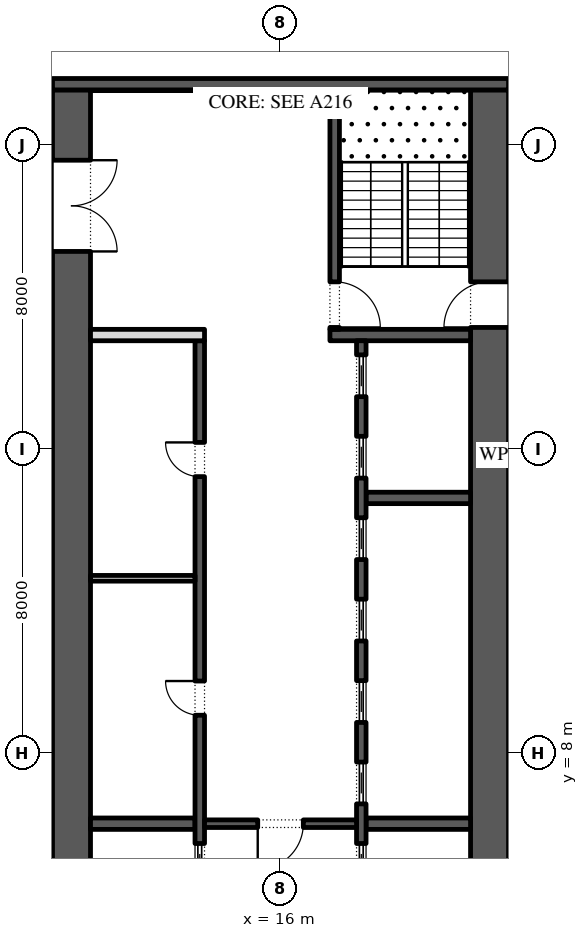
"""IFC4 building model, lengths in metres.
Left out: names, types, materials, properties, quantities, classifications, styles, units other than length and angle.
Written with IfcOpenShell. Run it as: python <this file> out.ifc"""

import sys

from ifc_helpers import new_model, si_unit, direction, frame, frame_2d, origin, place, context, subcontext, project, spatial, rectangle, extrude, element, fill, save


model = new_model("IFC4")
c1 = context("Model", 3, precision=1e-05, world=origin(), true_north=direction((0.0, 1.0)))
c2 = subcontext(c1, "Body", "Model", "MODEL_VIEW")
j1 = project(units=[si_unit("LENGTHUNIT", "METRE"), si_unit("PLANEANGLEUNIT", "RADIAN")], contexts=[c1])
p1 = place(None, origin())
s1 = spatial("IfcSite", under=j1, at=p1, CompositionType="ELEMENT")
p2 = place(p1, origin())
s2 = spatial("IfcBuilding", under=s1, at=p2, CompositionType="ELEMENT")
p3 = place(p2, frame((0.0, 0.0, 64.8)))
s3 = spatial("IfcBuildingStorey", under=s2, at=p3, CompositionType="ELEMENT", Elevation=64.8)
p4 = place(p3, frame((21.5, -2.45, 0.0), z_axis=(0.0, 0.0, 1.0), x_axis=(0.0, 1.0, 0.0)))
e1 = element("IfcWall", 1, at=p4, inside=s3, PredefinedType="SHEAR", context=c2, shape_type="SweptSolid", body=[
    extrude(rectangle(XDim=27.9, YDim=1.0, at=frame_2d((13.95, 0.0))), origin(), (0.0, 0.0, 1.0), 4.0),
])
p5 = place(p4, frame((5.05, 0.0, 0.0)))
e2 = element("IfcOpeningElement", 2, at=p5, cuts=e1, PredefinedType="OPENING", context=c2, shape_type="SweptSolid", body=[
    extrude(rectangle(XDim=1.2, YDim=2.1, at=frame_2d((0.6, 1.05))), frame((0.0, 0.51, 0.0), z_axis=(0.0, -1.0, 0.0), x_axis=(1.0, 0.0, 0.0)), (0.0, 0.0, 1.0), 1.02),
])
p6 = place(p4, frame((21.65, 0.0, 0.0)))
e3 = element("IfcOpeningElement", 3, at=p6, cuts=e1, PredefinedType="OPENING", context=c2, shape_type="SweptSolid", body=[
    extrude(rectangle(XDim=1.2, YDim=2.1, at=frame_2d((0.6, 1.05))), frame((0.0, 0.51, 0.0), z_axis=(0.0, -1.0, 0.0), x_axis=(1.0, 0.0, 0.0)), (0.0, 0.0, 1.0), 1.02),
])
p7 = place(p3, frame((10.5, -2.45, 0.0), z_axis=(0.0, 0.0, 1.0), x_axis=(0.0, 1.0, 0.0)))
e4 = element("IfcWall", 4, at=p7, inside=s3, PredefinedType="SHEAR", context=c2, shape_type="SweptSolid", body=[
    extrude(rectangle(XDim=27.9, YDim=1.0, at=frame_2d((13.95, 0.0))), origin(), (0.0, 0.0, 1.0), 4.0),
])
p8 = place(p7, frame((23.65, 0.0, 0.0)))
e5 = element("IfcOpeningElement", 5, at=p8, cuts=e4, PredefinedType="OPENING", context=c2, shape_type="SweptSolid", body=[
    extrude(rectangle(XDim=2.4, YDim=2.1, at=frame_2d((1.2, 1.05))), frame((0.0, 0.51, 0.0), z_axis=(0.0, -1.0, 0.0), x_axis=(1.0, 0.0, 0.0)), (0.0, 0.0, 1.0), 1.02),
])
p9 = place(p7, frame((1.387, 0.0, 0.0)))
e6 = element("IfcOpeningElement", 6, at=p9, cuts=e4, PredefinedType="OPENING", context=c2, shape_type="SweptSolid", body=[
    extrude(rectangle(XDim=0.9, YDim=2.1, at=frame_2d((0.45, 1.05))), frame((0.0, 0.51, 0.0), z_axis=(0.0, -1.0, 0.0), x_axis=(1.0, 0.0, 0.0)), (0.0, 0.0, 1.0), 1.02),
])
p10 = place(p7, frame((4.613, 0.0, 0.0)))
e7 = element("IfcOpeningElement", 7, at=p10, cuts=e4, PredefinedType="OPENING", context=c2, shape_type="SweptSolid", body=[
    extrude(rectangle(XDim=0.9, YDim=2.1, at=frame_2d((0.45, 1.05))), frame((0.0, 0.51, 0.0), z_axis=(0.0, -1.0, 0.0), x_axis=(1.0, 0.0, 0.0)), (0.0, 0.0, 1.0), 1.02),
])
p11 = place(p3, frame((10.0, 25.6, 0.0), z_axis=(0.0, 0.0, 1.0), x_axis=(1.0, 0.0, 0.0)))
e8 = element("IfcWall", 8, at=p11, inside=s3, PredefinedType="SHEAR", context=c2, shape_type="SweptSolid", body=[
    extrude(rectangle(XDim=12.0, YDim=0.3, at=frame_2d((6.0, 0.0))), origin(), (0.0, 0.0, 1.0), 4.0),
])
p12 = place(p3, frame((17.3, 19.0, 0.0), z_axis=(0.0, 0.0, 1.0), x_axis=(1.0, 0.0, 0.0)))
e9 = element("IfcWall", 9, at=p12, inside=s3, PredefinedType="SHEAR", context=c2, shape_type="SweptSolid", body=[
    extrude(rectangle(XDim=3.7, YDim=0.3, at=frame_2d((1.85, 0.0))), origin(), (0.0, 0.0, 1.0), 4.0),
])
p13 = place(p3, frame((17.425, 19.15, 0.0), z_axis=(0.0, 0.0, 1.0), x_axis=(0.0, 1.0, 0.0)))
e10 = element("IfcWall", 10, at=p13, inside=s3, PredefinedType="SHEAR", context=c2, shape_type="SweptSolid", body=[
    extrude(rectangle(XDim=6.3, YDim=0.25, at=frame_2d((3.15, 0.0))), origin(), (0.0, 0.0, 1.0), 4.0),
])
p14 = place(p13, frame((0.05, 0.0, 0.0)))
e11 = element("IfcOpeningElement", 11, at=p14, cuts=e10, PredefinedType="OPENING", context=c2, shape_type="SweptSolid", body=[
    extrude(rectangle(XDim=1.2, YDim=2.1, at=frame_2d((0.6, 1.05))), frame((0.0, 0.135, 0.0), z_axis=(0.0, -1.0, 0.0), x_axis=(1.0, 0.0, 0.0)), (0.0, 0.0, 1.0), 0.27),
])
for number, where, z_axis, x_axis in (
    (12, (18.25, 6.143, 0.0), (0.0, 0.0, 1.0), (1.0, 0.0, 0.0)),
    (13, (18.25, 14.714, 0.0), (0.0, 0.0, 1.0), (1.0, 0.0, 0.0)),
):
    element("IfcWall", number, at=place(p3, frame(where, z_axis=z_axis, x_axis=x_axis)), inside=s3, PredefinedType="SHEAR", context=c2, shape_type="SweptSolid", body=[
        extrude(rectangle(XDim=2.75, YDim=0.3, at=frame_2d((1.375, 0.0))), origin(), (0.0, 0.0, 1.0), 4.0),
    ])
p15 = place(p3, frame((18.125, 4.15, 0.0), z_axis=(0.0, 0.0, 1.0), x_axis=(0.0, 1.0, 0.0)))
e14 = element("IfcWall", 14, at=p15, inside=s3, PredefinedType="SHEAR", context=c2, shape_type="SweptSolid", body=[
    extrude(rectangle(XDim=14.7, YDim=0.25, at=frame_2d((7.35, 0.0))), origin(), (0.0, 0.0, 1.0), 4.0),
])
p16 = place(p15, frame((0.371, 0.0, 0.0)))
e15 = element("IfcOpeningElement", 15, at=p16, cuts=e14, PredefinedType="OPENING", context=c2, shape_type="SweptSolid", body=[
    extrude(rectangle(XDim=1.1, YDim=2.1, at=frame_2d((0.55, 1.05))), frame((0.0, 0.135, 0.0), z_axis=(0.0, -1.0, 0.0), x_axis=(1.0, 0.0, 0.0)), (0.0, 0.0, 1.0), 0.27),
])
p17 = place(p15, frame((2.514, 0.0, 0.0)))
e16 = element("IfcOpeningElement", 16, at=p17, cuts=e14, PredefinedType="OPENING", context=c2, shape_type="SweptSolid", body=[
    extrude(rectangle(XDim=1.1, YDim=2.1, at=frame_2d((0.55, 1.05))), frame((0.0, 0.135, 0.0), z_axis=(0.0, -1.0, 0.0), x_axis=(1.0, 0.0, 0.0)), (0.0, 0.0, 1.0), 0.27),
])
p18 = place(p15, frame((4.657, 0.0, 0.0)))
e17 = element("IfcOpeningElement", 17, at=p18, cuts=e14, PredefinedType="OPENING", context=c2, shape_type="SweptSolid", body=[
    extrude(rectangle(XDim=1.1, YDim=2.1, at=frame_2d((0.55, 1.05))), frame((0.0, 0.135, 0.0), z_axis=(0.0, -1.0, 0.0), x_axis=(1.0, 0.0, 0.0)), (0.0, 0.0, 1.0), 0.27),
])
p19 = place(p15, frame((6.8, 0.0, 0.0)))
e18 = element("IfcOpeningElement", 18, at=p19, cuts=e14, PredefinedType="OPENING", context=c2, shape_type="SweptSolid", body=[
    extrude(rectangle(XDim=1.1, YDim=2.1, at=frame_2d((0.55, 1.05))), frame((0.0, 0.135, 0.0), z_axis=(0.0, -1.0, 0.0), x_axis=(1.0, 0.0, 0.0)), (0.0, 0.0, 1.0), 0.27),
])
p20 = place(p15, frame((8.943, 0.0, 0.0)))
e19 = element("IfcOpeningElement", 19, at=p20, cuts=e14, PredefinedType="OPENING", context=c2, shape_type="SweptSolid", body=[
    extrude(rectangle(XDim=1.1, YDim=2.1, at=frame_2d((0.55, 1.05))), frame((0.0, 0.135, 0.0), z_axis=(0.0, -1.0, 0.0), x_axis=(1.0, 0.0, 0.0)), (0.0, 0.0, 1.0), 0.27),
])
p21 = place(p15, frame((11.086, 0.0, 0.0)))
e20 = element("IfcOpeningElement", 20, at=p21, cuts=e14, PredefinedType="OPENING", context=c2, shape_type="SweptSolid", body=[
    extrude(rectangle(XDim=1.1, YDim=2.1, at=frame_2d((0.55, 1.05))), frame((0.0, 0.135, 0.0), z_axis=(0.0, -1.0, 0.0), x_axis=(1.0, 0.0, 0.0)), (0.0, 0.0, 1.0), 0.27),
])
p22 = place(p15, frame((13.229, 0.0, 0.0)))
e21 = element("IfcOpeningElement", 21, at=p22, cuts=e14, PredefinedType="OPENING", context=c2, shape_type="SweptSolid", body=[
    extrude(rectangle(XDim=1.1, YDim=2.1, at=frame_2d((0.55, 1.05))), frame((0.0, 0.135, 0.0), z_axis=(0.0, -1.0, 0.0), x_axis=(1.0, 0.0, 0.0)), (0.0, 0.0, 1.0), 0.27),
])
p23 = place(p3, frame((11.0, 6.143, 0.0), z_axis=(0.0, 0.0, 1.0), x_axis=(1.0, 0.0, 0.0)))
e22 = element("IfcWall", 22, at=p23, inside=s3, PredefinedType="SHEAR", context=c2, shape_type="SweptSolid", body=[
    extrude(rectangle(XDim=2.75, YDim=0.3, at=frame_2d((1.375, 0.0))), origin(), (0.0, 0.0, 1.0), 4.0),
])
p24 = place(p3, frame((13.875, -2.45, 0.0), z_axis=(0.0, 0.0, 1.0), x_axis=(0.0, 1.0, 0.0)))
e23 = element("IfcWall", 23, at=p24, inside=s3, PredefinedType="SHEAR", context=c2, shape_type="SweptSolid", body=[
    extrude(rectangle(XDim=21.3, YDim=0.25, at=frame_2d((10.65, 0.0))), origin(), (0.0, 0.0, 1.0), 4.0),
])
p25 = place(p24, frame((11.446, 0.0, 0.0)))
e24 = element("IfcOpeningElement", 24, at=p25, cuts=e23, PredefinedType="OPENING", context=c2, shape_type="SweptSolid", body=[
    extrude(rectangle(XDim=0.9, YDim=2.1, at=frame_2d((0.45, 1.05))), frame((0.0, 0.135, 0.0), z_axis=(0.0, -1.0, 0.0), x_axis=(1.0, 0.0, 0.0)), (0.0, 0.0, 1.0), 0.27),
])
p26 = place(p24, frame((17.725, 0.0, 0.0)))
e25 = element("IfcOpeningElement", 25, at=p26, cuts=e23, PredefinedType="OPENING", context=c2, shape_type="SweptSolid", body=[
    extrude(rectangle(XDim=0.9, YDim=2.1, at=frame_2d((0.45, 1.05))), frame((0.0, 0.135, 0.0), z_axis=(0.0, -1.0, 0.0), x_axis=(1.0, 0.0, 0.0)), (0.0, 0.0, 1.0), 0.27),
])
p27 = place(p24, frame((6.971, 0.0, 0.0)))
e26 = element("IfcOpeningElement", 26, at=p27, cuts=e23, PredefinedType="OPENING", context=c2, shape_type="SweptSolid", body=[
    extrude(rectangle(XDim=1.1, YDim=2.1, at=frame_2d((0.55, 1.05))), frame((0.0, 0.135, 0.0), z_axis=(0.0, -1.0, 0.0), x_axis=(1.0, 0.0, 0.0)), (0.0, 0.0, 1.0), 0.27),
])
p28 = place(p3, frame((11.0, 19.0, 0.0), z_axis=(0.0, 0.0, 1.0), x_axis=(1.0, 0.0, 0.0)))
e27 = element("IfcWall", 27, at=p28, inside=s3, PredefinedType="PARTITIONING", context=c2, shape_type="SweptSolid", body=[
    extrude(rectangle(XDim=3.0, YDim=0.3, at=frame_2d((1.5, 0.0))), origin(), (0.0, 0.0, 1.0), 4.0),
])
p29 = place(p3, frame((11.0, 12.6, 0.0), z_axis=(0.0, 0.0, 1.0), x_axis=(1.0, 0.0, 0.0)))
e28 = element("IfcWall", 28, at=p29, inside=s3, PredefinedType="PARTITIONING", context=c2, shape_type="SweptSolid", body=[
    extrude(rectangle(XDim=2.75, YDim=0.15, at=frame_2d((1.375, 0.0))), origin(), (0.0, 0.0, 1.0), 4.0),
])
p30 = place(p3, frame((14.0, 6.143, 0.0), z_axis=(0.0, 0.0, 1.0), x_axis=(1.0, 0.0, 0.0)))
e29 = element("IfcWall", 29, at=p30, inside=s3, PredefinedType="SHEAR", context=c2, shape_type="SweptSolid", body=[
    extrude(rectangle(XDim=4.0, YDim=0.2, at=frame_2d((2.0, 0.0))), origin(), (0.0, 0.0, 1.0), 4.0),
])
p31 = place(p30, frame((1.4, 0.0, 0.0)))
e30 = element("IfcOpeningElement", 30, at=p31, cuts=e29, PredefinedType="OPENING", context=c2, shape_type="SweptSolid", body=[
    extrude(rectangle(XDim=1.2, YDim=2.1, at=frame_2d((0.6, 1.05))), frame((0.0, 0.11, 0.0), z_axis=(0.0, -1.0, 0.0), x_axis=(1.0, 0.0, 0.0)), (0.0, 0.0, 1.0), 0.22),
])
p32 = place(p16, origin())
e31 = element("IfcDoor", 31, at=p32, inside=s3, OperationType="SLIDING_TO_LEFT", PredefinedType="DOOR", context=c2, shape_type="SweptSolid", body=[
    extrude(rectangle(XDim=1.1, YDim=2.1, at=frame_2d((0.55, 1.05))), frame((0.0, 0.025, 0.0), z_axis=(0.0, -1.0, 0.0), x_axis=(1.0, 0.0, 0.0)), (0.0, 0.0, 1.0), 0.05),
])
fill(e15, e31)
p33 = place(p17, origin())
e32 = element("IfcDoor", 32, at=p33, inside=s3, OperationType="SLIDING_TO_LEFT", PredefinedType="DOOR", context=c2, shape_type="SweptSolid", body=[
    extrude(rectangle(XDim=1.1, YDim=2.1, at=frame_2d((0.55, 1.05))), frame((0.0, 0.025, 0.0), z_axis=(0.0, -1.0, 0.0), x_axis=(1.0, 0.0, 0.0)), (0.0, 0.0, 1.0), 0.05),
])
fill(e16, e32)
p34 = place(p18, origin())
e33 = element("IfcDoor", 33, at=p34, inside=s3, OperationType="SLIDING_TO_LEFT", PredefinedType="DOOR", context=c2, shape_type="SweptSolid", body=[
    extrude(rectangle(XDim=1.1, YDim=2.1, at=frame_2d((0.55, 1.05))), frame((0.0, 0.025, 0.0), z_axis=(0.0, -1.0, 0.0), x_axis=(1.0, 0.0, 0.0)), (0.0, 0.0, 1.0), 0.05),
])
fill(e17, e33)
p35 = place(p19, origin())
e34 = element("IfcDoor", 34, at=p35, inside=s3, OperationType="SLIDING_TO_LEFT", PredefinedType="DOOR", context=c2, shape_type="SweptSolid", body=[
    extrude(rectangle(XDim=1.1, YDim=2.1, at=frame_2d((0.55, 1.05))), frame((0.0, 0.025, 0.0), z_axis=(0.0, -1.0, 0.0), x_axis=(1.0, 0.0, 0.0)), (0.0, 0.0, 1.0), 0.05),
])
fill(e18, e34)
p36 = place(p20, origin())
e35 = element("IfcDoor", 35, at=p36, inside=s3, OperationType="SLIDING_TO_LEFT", PredefinedType="DOOR", context=c2, shape_type="SweptSolid", body=[
    extrude(rectangle(XDim=1.1, YDim=2.1, at=frame_2d((0.55, 1.05))), frame((0.0, 0.025, 0.0), z_axis=(0.0, -1.0, 0.0), x_axis=(1.0, 0.0, 0.0)), (0.0, 0.0, 1.0), 0.05),
])
fill(e19, e35)
p37 = place(p21, origin())
e36 = element("IfcDoor", 36, at=p37, inside=s3, OperationType="SLIDING_TO_LEFT", PredefinedType="DOOR", context=c2, shape_type="SweptSolid", body=[
    extrude(rectangle(XDim=1.1, YDim=2.1, at=frame_2d((0.55, 1.05))), frame((0.0, 0.025, 0.0), z_axis=(0.0, -1.0, 0.0), x_axis=(1.0, 0.0, 0.0)), (0.0, 0.0, 1.0), 0.05),
])
fill(e20, e36)
p38 = place(p22, origin())
e37 = element("IfcDoor", 37, at=p38, inside=s3, OperationType="SLIDING_TO_LEFT", PredefinedType="DOOR", context=c2, shape_type="SweptSolid", body=[
    extrude(rectangle(XDim=1.1, YDim=2.1, at=frame_2d((0.55, 1.05))), frame((0.0, 0.025, 0.0), z_axis=(0.0, -1.0, 0.0), x_axis=(1.0, 0.0, 0.0)), (0.0, 0.0, 1.0), 0.05),
])
fill(e21, e37)
p39 = place(p25, origin())
e38 = element("IfcDoor", 38, at=p39, inside=s3, OperationType="SINGLE_SWING_LEFT", PredefinedType="DOOR", context=c2, shape_type="SweptSolid", body=[
    extrude(rectangle(XDim=0.9, YDim=2.1, at=frame_2d((0.45, 1.05))), frame((0.0, 0.125, 0.0), z_axis=(0.0, -1.0, 0.0), x_axis=(1.0, 0.0, 0.0)), (0.0, 0.0, 1.0), 0.05),
])
fill(e24, e38)
p40 = place(p26, origin())
e39 = element("IfcDoor", 39, at=p40, inside=s3, OperationType="SINGLE_SWING_LEFT", PredefinedType="DOOR", context=c2, shape_type="SweptSolid", body=[
    extrude(rectangle(XDim=0.9, YDim=2.1, at=frame_2d((0.45, 1.05))), frame((0.0, 0.125, 0.0), z_axis=(0.0, -1.0, 0.0), x_axis=(1.0, 0.0, 0.0)), (0.0, 0.0, 1.0), 0.05),
])
fill(e25, e39)
p41 = place(p27, origin())
e40 = element("IfcDoor", 40, at=p41, inside=s3, OperationType="SLIDING_TO_LEFT", PredefinedType="DOOR", context=c2, shape_type="SweptSolid", body=[
    extrude(rectangle(XDim=1.1, YDim=2.1, at=frame_2d((0.55, 1.05))), frame((0.0, 0.025, 0.0), z_axis=(0.0, -1.0, 0.0), x_axis=(1.0, 0.0, 0.0)), (0.0, 0.0, 1.0), 0.05),
])
fill(e26, e40)
p42 = place(p31, frame((1.2, 0.0, 0.0), z_axis=(0.0, 0.0, 1.0), x_axis=(-1.0, 0.0, 0.0)))
e41 = element("IfcDoor", 41, at=p42, inside=s3, OperationType="SINGLE_SWING_LEFT", PredefinedType="DOOR", context=c2, shape_type="SweptSolid", body=[
    extrude(rectangle(XDim=1.2, YDim=2.1, at=frame_2d((0.6, 1.05))), frame((0.0, 0.025, 0.0), z_axis=(0.0, -1.0, 0.0), x_axis=(1.0, 0.0, 0.0)), (0.0, 0.0, 1.0), 0.05),
])
fill(e30, e41)
p43 = place(p8, frame((2.4, 0.0, 0.0), z_axis=(0.0, 0.0, 1.0), x_axis=(-1.0, 0.0, 0.0)))
e42 = element("IfcDoor", 42, at=p43, inside=s3, OperationType="DOUBLE_DOOR_SINGLE_SWING", PredefinedType="DOOR", context=c2, shape_type="SweptSolid", body=[
    extrude(rectangle(XDim=2.4, YDim=2.1, at=frame_2d((1.2, 1.05))), frame((0.0, 0.025, 0.0), z_axis=(0.0, -1.0, 0.0), x_axis=(1.0, 0.0, 0.0)), (0.0, 0.0, 1.0), 0.05),
])
fill(e5, e42)
p44 = place(p14, frame((1.2, 0.0, 0.0), z_axis=(0.0, 0.0, 1.0), x_axis=(-1.0, 0.0, 0.0)))
e43 = element("IfcDoor", 43, at=p44, inside=s3, OperationType="SINGLE_SWING_LEFT", PredefinedType="DOOR", context=c2, shape_type="SweptSolid", body=[
    extrude(rectangle(XDim=1.2, YDim=2.1, at=frame_2d((0.6, 1.05))), frame((0.0, 0.025, 0.0), z_axis=(0.0, -1.0, 0.0), x_axis=(1.0, 0.0, 0.0)), (0.0, 0.0, 1.0), 0.05),
])
fill(e11, e43)
p45 = place(p6, origin())
e44 = element("IfcDoor", 44, at=p45, inside=s3, OperationType="SINGLE_SWING_RIGHT", PredefinedType="DOOR", context=c2, shape_type="SweptSolid", body=[
    extrude(rectangle(XDim=1.2, YDim=2.1, at=frame_2d((0.6, 1.05))), frame((0.0, 0.025, 0.0), z_axis=(0.0, -1.0, 0.0), x_axis=(1.0, 0.0, 0.0)), (0.0, 0.0, 1.0), 0.05),
])
fill(e3, e44)
save(model, sys.argv[1])
